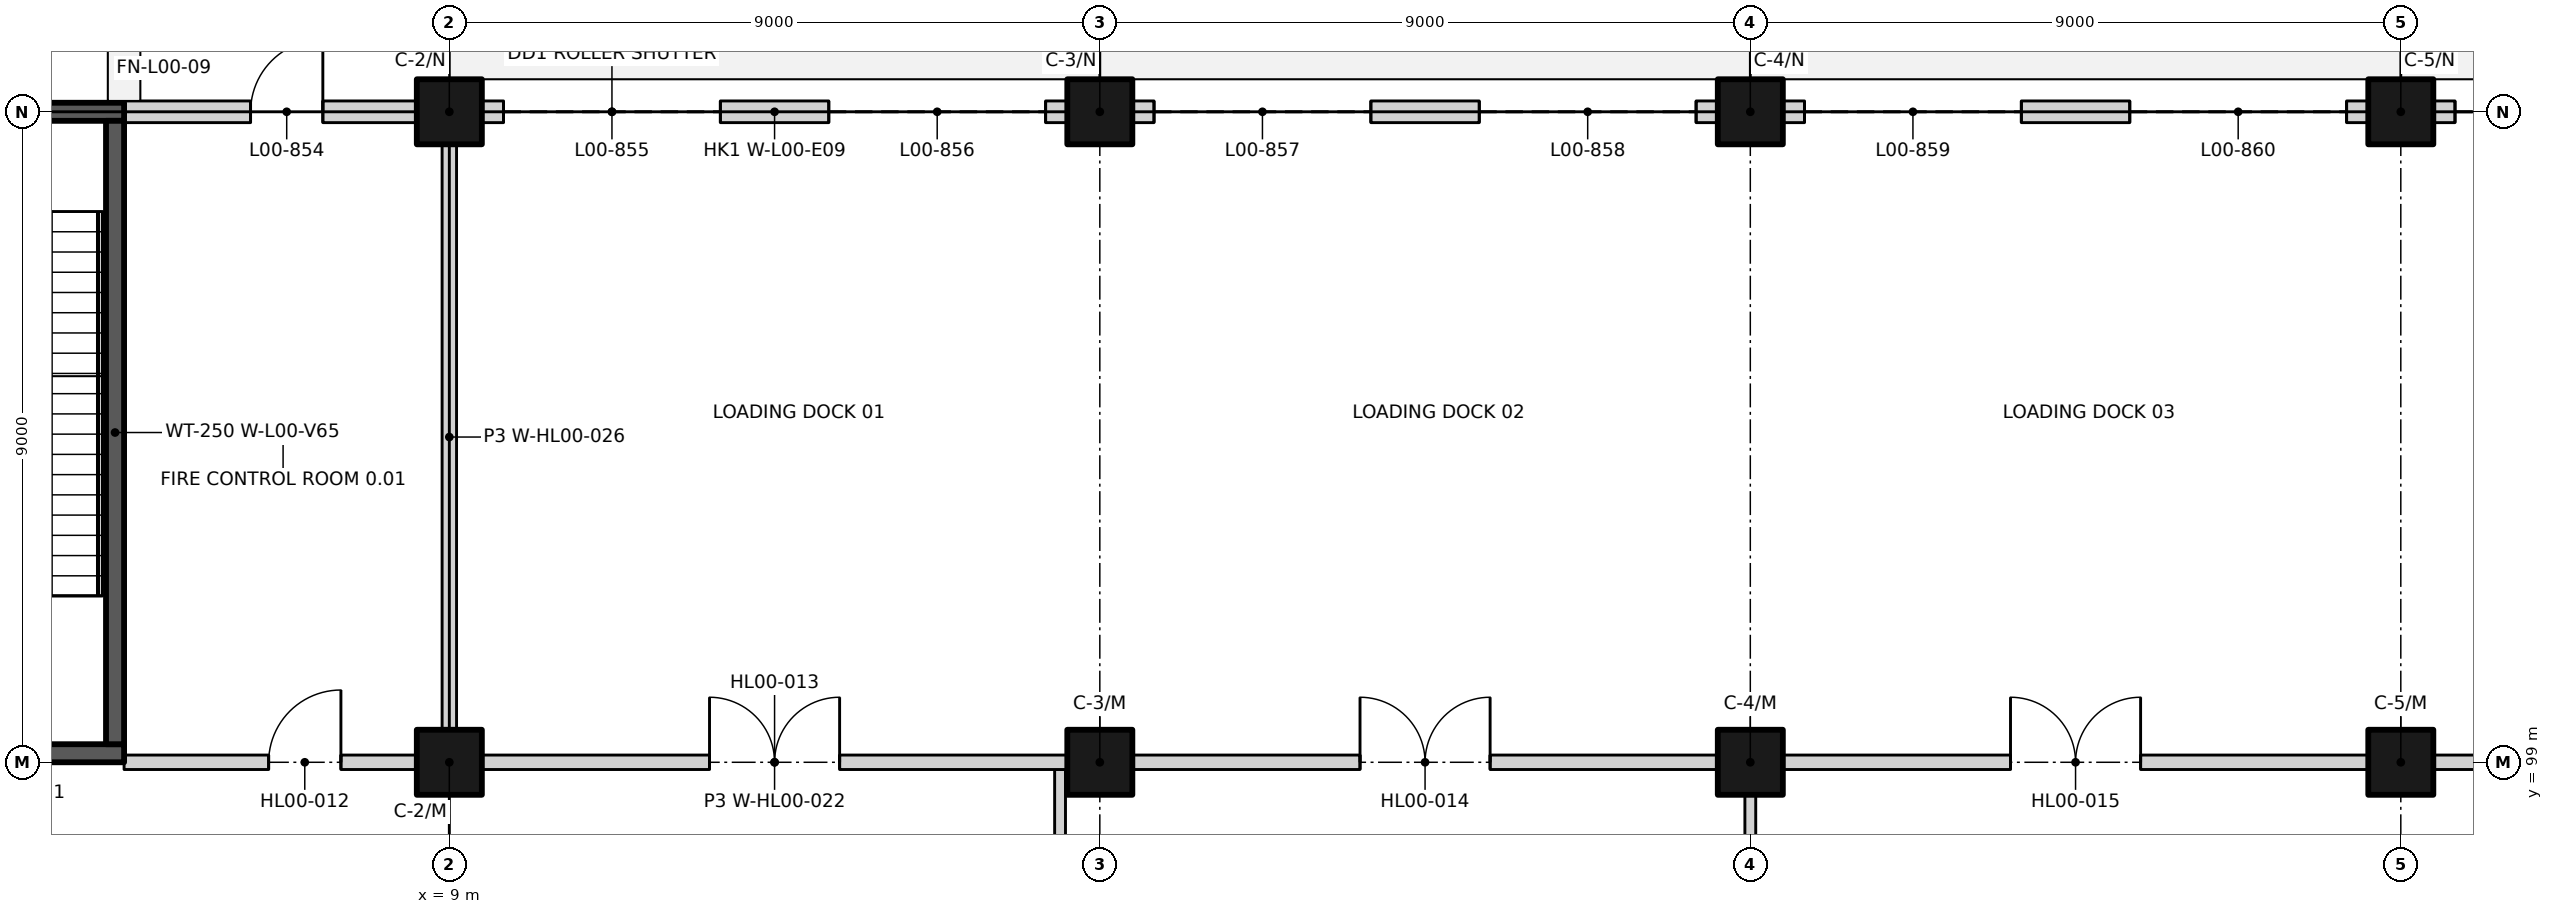
"""IFC4 building model, lengths in metres.
Left out: names, types, materials, properties, quantities, classifications, styles, units other than length and angle.
Written with IfcOpenShell. Run it as: python <this file> out.ifc"""

import sys

from ifc_helpers import new_model, si_unit, direction, frame, frame_2d, origin, origin_2d, place, context, subcontext, project, spatial, rectangle, extrude, element, fill, save


model = new_model("IFC4")
c1 = context("Model", 3, precision=1e-05, world=origin(), true_north=direction((0.0, 1.0)))
c2 = subcontext(c1, "Body", "Model", "MODEL_VIEW")
j1 = project(units=[si_unit("LENGTHUNIT", "METRE"), si_unit("PLANEANGLEUNIT", "RADIAN")], contexts=[c1])
p1 = place(None, origin())
s1 = spatial("IfcSite", under=j1, at=p1, CompositionType="ELEMENT")
p2 = place(p1, origin())
s2 = spatial("IfcBuilding", under=s1, at=p2, CompositionType="ELEMENT")
p3 = place(p2, origin())
s3 = spatial("IfcBuildingStorey", under=s2, at=p3, CompositionType="ELEMENT", Elevation=0.0)
for number, where, z_axis, x_axis in (
    (1, (9.0, 99.0, 0.0), (0.0, 0.0, 1.0), (1.0, 0.0, 0.0)),
    (2, (18.0, 99.0, 0.0), (0.0, 0.0, 1.0), (1.0, 0.0, 0.0)),
    (3, (27.0, 99.0, 0.0), (0.0, 0.0, 1.0), (1.0, 0.0, 0.0)),
    (4, (36.0, 99.0, 0.0), (0.0, 0.0, 1.0), (1.0, 0.0, 0.0)),
    (5, (9.0, 108.0, 0.0), (0.0, 0.0, 1.0), (1.0, 0.0, 0.0)),
    (6, (18.0, 108.0, 0.0), (0.0, 0.0, 1.0), (1.0, 0.0, 0.0)),
    (7, (27.0, 108.0, 0.0), (0.0, 0.0, 1.0), (1.0, 0.0, 0.0)),
    (8, (36.0, 108.0, 0.0), (0.0, 0.0, 1.0), (1.0, 0.0, 0.0)),
):
    element("IfcColumn", number, at=place(p3, frame(where, z_axis=z_axis, x_axis=x_axis)), inside=s3, PredefinedType="COLUMN", context=c2, shape_type="SweptSolid", body=[
        extrude(rectangle(XDim=0.9, YDim=0.9, at=origin_2d()), origin(), (0.0, 0.0, 1.0), 6.0),
    ])
p4 = place(p3, frame((0.45, 99.125, 0.0), z_axis=(0.0, 0.0, 1.0), x_axis=(1.0, 0.0, 0.0)))
e9 = element("IfcWall", 9, at=p4, inside=s3, PredefinedType="SHEAR", context=c2, shape_type="SweptSolid", body=[
    extrude(rectangle(XDim=4.05, YDim=0.25, at=frame_2d((2.025, 0.0))), origin(), (0.0, 0.0, 1.0), 6.0),
])
p5 = place(p4, frame((1.25, 0.0, 0.0)))
e10 = element("IfcOpeningElement", 10, at=p5, cuts=e9, PredefinedType="OPENING", context=c2, shape_type="SweptSolid", body=[
    extrude(rectangle(XDim=1.1, YDim=2.1, at=frame_2d((0.55, 1.05))), frame((0.0, 0.135, 0.0), z_axis=(0.0, -1.0, 0.0), x_axis=(1.0, 0.0, 0.0)), (0.0, 0.0, 1.0), 0.27),
])
p6 = place(p3, frame((2.188, 108.0, 0.0), z_axis=(0.0, 0.0, 1.0), x_axis=(1.0, 0.0, 0.0)))
e11 = element("IfcWall", 11, at=p6, inside=s3, PredefinedType="SHEAR", context=c2, shape_type="SweptSolid", body=[
    extrude(rectangle(XDim=2.312, YDim=0.25, at=frame_2d((1.156, 0.0))), origin(), (0.0, 0.0, 1.0), 6.0),
])
p7 = place(p3, frame((4.375, 99.25, 0.0), z_axis=(0.0, 0.0, 1.0), x_axis=(0.0, 1.0, 0.0)))
e12 = element("IfcWall", 12, at=p7, inside=s3, PredefinedType="SHEAR", context=c2, shape_type="SweptSolid", body=[
    extrude(rectangle(XDim=8.625, YDim=0.25, at=frame_2d((4.312, 0.0))), origin(), (0.0, 0.0, 1.0), 6.0),
])
p8 = place(p3, frame((4.5, 108.0, 0.0), z_axis=(0.0, 0.0, 1.0), x_axis=(1.0, 0.0, 0.0)))
e13 = element("IfcWall", 13, at=p8, inside=s3, PredefinedType="SOLIDWALL", context=c2, shape_type="SweptSolid", body=[
    extrude(rectangle(XDim=4.05, YDim=0.3, at=frame_2d((2.025, 0.0))), origin(), (0.0, 0.0, 1.0), 5.2),
])
p9 = place(p8, frame((1.75, 0.0, 0.0)))
e14 = element("IfcOpeningElement", 14, at=p9, cuts=e13, PredefinedType="OPENING", context=c2, shape_type="SweptSolid", body=[
    extrude(rectangle(XDim=1.0, YDim=2.1, at=frame_2d((0.5, 1.05))), frame((0.0, 0.16, 0.0), z_axis=(0.0, -1.0, 0.0), x_axis=(1.0, 0.0, 0.0)), (0.0, 0.0, 1.0), 0.32),
])
p10 = place(p3, frame((9.45, 108.0, 0.0), z_axis=(0.0, 0.0, 1.0), x_axis=(1.0, 0.0, 0.0)))
e15 = element("IfcWall", 15, at=p10, inside=s3, PredefinedType="SOLIDWALL", context=c2, shape_type="SweptSolid", body=[
    extrude(rectangle(XDim=8.1, YDim=0.3, at=frame_2d((4.05, 0.0))), origin(), (0.0, 0.0, 1.0), 5.2),
])
p11 = place(p10, frame((0.3, 0.0, 0.0)))
e16 = element("IfcOpeningElement", 16, at=p11, cuts=e15, PredefinedType="OPENING", context=c2, shape_type="SweptSolid", body=[
    extrude(rectangle(XDim=3.0, YDim=4.2, at=frame_2d((1.5, 2.1))), frame((0.0, 0.16, 0.0), z_axis=(0.0, -1.0, 0.0), x_axis=(1.0, 0.0, 0.0)), (0.0, 0.0, 1.0), 0.32),
])
p12 = place(p10, frame((4.8, 0.0, 0.0)))
e17 = element("IfcOpeningElement", 17, at=p12, cuts=e15, PredefinedType="OPENING", context=c2, shape_type="SweptSolid", body=[
    extrude(rectangle(XDim=3.0, YDim=4.2, at=frame_2d((1.5, 2.1))), frame((0.0, 0.16, 0.0), z_axis=(0.0, -1.0, 0.0), x_axis=(1.0, 0.0, 0.0)), (0.0, 0.0, 1.0), 0.32),
])
p13 = place(p3, frame((18.45, 108.0, 0.0), z_axis=(0.0, 0.0, 1.0), x_axis=(1.0, 0.0, 0.0)))
e18 = element("IfcWall", 18, at=p13, inside=s3, PredefinedType="SOLIDWALL", context=c2, shape_type="SweptSolid", body=[
    extrude(rectangle(XDim=8.1, YDim=0.3, at=frame_2d((4.05, 0.0))), origin(), (0.0, 0.0, 1.0), 5.2),
])
p14 = place(p13, frame((0.3, 0.0, 0.0)))
e19 = element("IfcOpeningElement", 19, at=p14, cuts=e18, PredefinedType="OPENING", context=c2, shape_type="SweptSolid", body=[
    extrude(rectangle(XDim=3.0, YDim=4.2, at=frame_2d((1.5, 2.1))), frame((0.0, 0.16, 0.0), z_axis=(0.0, -1.0, 0.0), x_axis=(1.0, 0.0, 0.0)), (0.0, 0.0, 1.0), 0.32),
])
p15 = place(p13, frame((4.8, 0.0, 0.0)))
e20 = element("IfcOpeningElement", 20, at=p15, cuts=e18, PredefinedType="OPENING", context=c2, shape_type="SweptSolid", body=[
    extrude(rectangle(XDim=3.0, YDim=4.2, at=frame_2d((1.5, 2.1))), frame((0.0, 0.16, 0.0), z_axis=(0.0, -1.0, 0.0), x_axis=(1.0, 0.0, 0.0)), (0.0, 0.0, 1.0), 0.32),
])
p16 = place(p3, frame((27.45, 108.0, 0.0), z_axis=(0.0, 0.0, 1.0), x_axis=(1.0, 0.0, 0.0)))
e21 = element("IfcWall", 21, at=p16, inside=s3, PredefinedType="SOLIDWALL", context=c2, shape_type="SweptSolid", body=[
    extrude(rectangle(XDim=8.1, YDim=0.3, at=frame_2d((4.05, 0.0))), origin(), (0.0, 0.0, 1.0), 5.2),
])
p17 = place(p16, frame((0.3, 0.0, 0.0)))
e22 = element("IfcOpeningElement", 22, at=p17, cuts=e21, PredefinedType="OPENING", context=c2, shape_type="SweptSolid", body=[
    extrude(rectangle(XDim=3.0, YDim=4.2, at=frame_2d((1.5, 2.1))), frame((0.0, 0.16, 0.0), z_axis=(0.0, -1.0, 0.0), x_axis=(1.0, 0.0, 0.0)), (0.0, 0.0, 1.0), 0.32),
])
p18 = place(p16, frame((4.8, 0.0, 0.0)))
e23 = element("IfcOpeningElement", 23, at=p18, cuts=e21, PredefinedType="OPENING", context=c2, shape_type="SweptSolid", body=[
    extrude(rectangle(XDim=3.0, YDim=4.2, at=frame_2d((1.5, 2.1))), frame((0.0, 0.16, 0.0), z_axis=(0.0, -1.0, 0.0), x_axis=(1.0, 0.0, 0.0)), (0.0, 0.0, 1.0), 0.32),
])
p19 = place(p3, frame((36.45, 108.0, 0.0), z_axis=(0.0, 0.0, 1.0), x_axis=(1.0, 0.0, 0.0)))
e24 = element("IfcWall", 24, at=p19, inside=s3, PredefinedType="SOLIDWALL", context=c2, shape_type="SweptSolid", body=[
    extrude(rectangle(XDim=8.1, YDim=0.3, at=frame_2d((4.05, 0.0))), origin(), (0.0, 0.0, 1.0), 5.2),
])
p20 = place(p19, frame((0.3, 0.0, 0.0)))
e25 = element("IfcOpeningElement", 25, at=p20, cuts=e24, PredefinedType="OPENING", context=c2, shape_type="SweptSolid", body=[
    extrude(rectangle(XDim=3.0, YDim=4.2, at=frame_2d((1.5, 2.1))), frame((0.0, 0.16, 0.0), z_axis=(0.0, -1.0, 0.0), x_axis=(1.0, 0.0, 0.0)), (0.0, 0.0, 1.0), 0.32),
])
p21 = place(p19, frame((4.8, 0.0, 0.0)))
e26 = element("IfcOpeningElement", 26, at=p21, cuts=e24, PredefinedType="OPENING", context=c2, shape_type="SweptSolid", body=[
    extrude(rectangle(XDim=3.0, YDim=4.2, at=frame_2d((1.5, 2.1))), frame((0.0, 0.16, 0.0), z_axis=(0.0, -1.0, 0.0), x_axis=(1.0, 0.0, 0.0)), (0.0, 0.0, 1.0), 0.32),
])
p22 = place(p3, frame((17.45, 90.075, 0.0), z_axis=(0.0, 0.0, 1.0), x_axis=(0.0, 1.0, 0.0)))
e27 = element("IfcWall", 27, at=p22, inside=s3, PredefinedType="PARTITIONING", context=c2, shape_type="SweptSolid", body=[
    extrude(rectangle(XDim=8.825, YDim=0.15, at=frame_2d((4.413, 0.0))), origin(), (0.0, 0.0, 1.0), 5.7),
])
p23 = place(p22, frame((7.675, 0.0, 0.0), z_axis=(0.0, 0.0, 1.0), x_axis=(-1.0, 0.0, 0.0)))
e28 = element("IfcOpeningElement", 28, at=p23, cuts=e27, PredefinedType="OPENING", context=c2, shape_type="SweptSolid", body=[
    extrude(rectangle(XDim=1.5, YDim=2.1, at=frame_2d((0.75, 1.05))), frame((0.0, 0.085, 0.0), z_axis=(0.0, -1.0, 0.0), x_axis=(1.0, 0.0, 0.0)), (0.0, 0.0, 1.0), 0.17),
])
p24 = place(p3, frame((27.0, 90.45, 0.0), z_axis=(0.0, 0.0, 1.0), x_axis=(0.0, 1.0, 0.0)))
e29 = element("IfcWall", 29, at=p24, inside=s3, PredefinedType="PARTITIONING", context=c2, shape_type="SweptSolid", body=[
    extrude(rectangle(XDim=8.1, YDim=0.15, at=frame_2d((4.05, 0.0))), origin(), (0.0, 0.0, 1.0), 5.7),
])
p25 = place(p24, frame((2.8, 0.0, 0.0)))
e30 = element("IfcOpeningElement", 30, at=p25, cuts=e29, PredefinedType="OPENING", context=c2, shape_type="SweptSolid", body=[
    extrude(rectangle(XDim=1.5, YDim=2.1, at=frame_2d((0.75, 1.05))), frame((0.0, 0.085, 0.0), z_axis=(0.0, -1.0, 0.0), x_axis=(1.0, 0.0, 0.0)), (0.0, 0.0, 1.0), 0.17),
])
p26 = place(p3, frame((4.5, 99.0, 0.0), z_axis=(0.0, 0.0, 1.0), x_axis=(1.0, 0.0, 0.0)))
e31 = element("IfcWall", 31, at=p26, inside=s3, PredefinedType="PARTITIONING", context=c2, shape_type="SweptSolid", body=[
    extrude(rectangle(XDim=4.05, YDim=0.2, at=frame_2d((2.025, 0.0))), origin(), (0.0, 0.0, 1.0), 5.7),
])
p27 = place(p26, frame((2.0, 0.0, 0.0)))
e32 = element("IfcOpeningElement", 32, at=p27, cuts=e31, PredefinedType="OPENING", context=c2, shape_type="SweptSolid", body=[
    extrude(rectangle(XDim=1.0, YDim=2.1, at=frame_2d((0.5, 1.05))), frame((0.0, 0.11, 0.0), z_axis=(0.0, -1.0, 0.0), x_axis=(1.0, 0.0, 0.0)), (0.0, 0.0, 1.0), 0.22),
])
p28 = place(p3, frame((9.45, 99.0, 0.0), z_axis=(0.0, 0.0, 1.0), x_axis=(1.0, 0.0, 0.0)))
e33 = element("IfcWall", 33, at=p28, inside=s3, PredefinedType="PARTITIONING", context=c2, shape_type="SweptSolid", body=[
    extrude(rectangle(XDim=8.1, YDim=0.2, at=frame_2d((4.05, 0.0))), origin(), (0.0, 0.0, 1.0), 5.7),
])
p29 = place(p28, frame((3.15, 0.0, 0.0)))
e34 = element("IfcOpeningElement", 34, at=p29, cuts=e33, PredefinedType="OPENING", context=c2, shape_type="SweptSolid", body=[
    extrude(rectangle(XDim=1.8, YDim=2.4, at=frame_2d((0.9, 1.2))), frame((0.0, 0.11, 0.0), z_axis=(0.0, -1.0, 0.0), x_axis=(1.0, 0.0, 0.0)), (0.0, 0.0, 1.0), 0.22),
])
p30 = place(p3, frame((18.45, 99.0, 0.0), z_axis=(0.0, 0.0, 1.0), x_axis=(1.0, 0.0, 0.0)))
e35 = element("IfcWall", 35, at=p30, inside=s3, PredefinedType="PARTITIONING", context=c2, shape_type="SweptSolid", body=[
    extrude(rectangle(XDim=8.1, YDim=0.2, at=frame_2d((4.05, 0.0))), origin(), (0.0, 0.0, 1.0), 5.7),
])
p31 = place(p30, frame((3.15, 0.0, 0.0)))
e36 = element("IfcOpeningElement", 36, at=p31, cuts=e35, PredefinedType="OPENING", context=c2, shape_type="SweptSolid", body=[
    extrude(rectangle(XDim=1.8, YDim=2.4, at=frame_2d((0.9, 1.2))), frame((0.0, 0.11, 0.0), z_axis=(0.0, -1.0, 0.0), x_axis=(1.0, 0.0, 0.0)), (0.0, 0.0, 1.0), 0.22),
])
p32 = place(p3, frame((27.45, 99.0, 0.0), z_axis=(0.0, 0.0, 1.0), x_axis=(1.0, 0.0, 0.0)))
e37 = element("IfcWall", 37, at=p32, inside=s3, PredefinedType="PARTITIONING", context=c2, shape_type="SweptSolid", body=[
    extrude(rectangle(XDim=8.1, YDim=0.2, at=frame_2d((4.05, 0.0))), origin(), (0.0, 0.0, 1.0), 5.7),
])
p33 = place(p32, frame((3.15, 0.0, 0.0)))
e38 = element("IfcOpeningElement", 38, at=p33, cuts=e37, PredefinedType="OPENING", context=c2, shape_type="SweptSolid", body=[
    extrude(rectangle(XDim=1.8, YDim=2.4, at=frame_2d((0.9, 1.2))), frame((0.0, 0.11, 0.0), z_axis=(0.0, -1.0, 0.0), x_axis=(1.0, 0.0, 0.0)), (0.0, 0.0, 1.0), 0.22),
])
p34 = place(p3, frame((36.45, 99.0, 0.0), z_axis=(0.0, 0.0, 1.0), x_axis=(1.0, 0.0, 0.0)))
e39 = element("IfcWall", 39, at=p34, inside=s3, PredefinedType="PARTITIONING", context=c2, shape_type="SweptSolid", body=[
    extrude(rectangle(XDim=8.1, YDim=0.2, at=frame_2d((4.05, 0.0))), origin(), (0.0, 0.0, 1.0), 5.7),
])
p35 = place(p34, frame((3.15, 0.0, 0.0)))
e40 = element("IfcOpeningElement", 40, at=p35, cuts=e39, PredefinedType="OPENING", context=c2, shape_type="SweptSolid", body=[
    extrude(rectangle(XDim=1.8, YDim=2.4, at=frame_2d((0.9, 1.2))), frame((0.0, 0.11, 0.0), z_axis=(0.0, -1.0, 0.0), x_axis=(1.0, 0.0, 0.0)), (0.0, 0.0, 1.0), 0.22),
])
p36 = place(p3, frame((9.0, 99.45, 0.0), z_axis=(0.0, 0.0, 1.0), x_axis=(0.0, 1.0, 0.0)))
e41 = element("IfcWall", 41, at=p36, inside=s3, PredefinedType="PARTITIONING", context=c2, shape_type="SweptSolid", body=[
    extrude(rectangle(XDim=8.1, YDim=0.2, at=frame_2d((4.05, 0.0))), origin(), (0.0, 0.0, 1.0), 5.7),
])
p37 = place(p9, origin())
e42 = element("IfcDoor", 42, at=p37, inside=s3, OperationType="SINGLE_SWING_RIGHT", PredefinedType="DOOR", context=c2, shape_type="SweptSolid", body=[
    extrude(rectangle(XDim=1.0, YDim=2.1, at=frame_2d((0.5, 1.05))), frame((0.0, 0.025, 0.0), z_axis=(0.0, -1.0, 0.0), x_axis=(1.0, 0.0, 0.0)), (0.0, 0.0, 1.0), 0.05),
])
fill(e14, e42)
p38 = place(p11, origin())
e43 = element("IfcDoor", 43, at=p38, inside=s3, OperationType="ROLLINGUP", PredefinedType="DOOR", context=c2, shape_type="SweptSolid", body=[
    extrude(rectangle(XDim=3.0, YDim=4.2, at=frame_2d((1.5, 2.1))), frame((0.0, 0.025, 0.0), z_axis=(0.0, -1.0, 0.0), x_axis=(1.0, 0.0, 0.0)), (0.0, 0.0, 1.0), 0.05),
])
fill(e16, e43)
p39 = place(p12, origin())
e44 = element("IfcDoor", 44, at=p39, inside=s3, OperationType="ROLLINGUP", PredefinedType="DOOR", context=c2, shape_type="SweptSolid", body=[
    extrude(rectangle(XDim=3.0, YDim=4.2, at=frame_2d((1.5, 2.1))), frame((0.0, 0.025, 0.0), z_axis=(0.0, -1.0, 0.0), x_axis=(1.0, 0.0, 0.0)), (0.0, 0.0, 1.0), 0.05),
])
fill(e17, e44)
p40 = place(p14, origin())
e45 = element("IfcDoor", 45, at=p40, inside=s3, OperationType="ROLLINGUP", PredefinedType="DOOR", context=c2, shape_type="SweptSolid", body=[
    extrude(rectangle(XDim=3.0, YDim=4.2, at=frame_2d((1.5, 2.1))), frame((0.0, 0.025, 0.0), z_axis=(0.0, -1.0, 0.0), x_axis=(1.0, 0.0, 0.0)), (0.0, 0.0, 1.0), 0.05),
])
fill(e19, e45)
p41 = place(p15, origin())
e46 = element("IfcDoor", 46, at=p41, inside=s3, OperationType="ROLLINGUP", PredefinedType="DOOR", context=c2, shape_type="SweptSolid", body=[
    extrude(rectangle(XDim=3.0, YDim=4.2, at=frame_2d((1.5, 2.1))), frame((0.0, 0.025, 0.0), z_axis=(0.0, -1.0, 0.0), x_axis=(1.0, 0.0, 0.0)), (0.0, 0.0, 1.0), 0.05),
])
fill(e20, e46)
p42 = place(p17, origin())
e47 = element("IfcDoor", 47, at=p42, inside=s3, OperationType="ROLLINGUP", PredefinedType="DOOR", context=c2, shape_type="SweptSolid", body=[
    extrude(rectangle(XDim=3.0, YDim=4.2, at=frame_2d((1.5, 2.1))), frame((0.0, 0.025, 0.0), z_axis=(0.0, -1.0, 0.0), x_axis=(1.0, 0.0, 0.0)), (0.0, 0.0, 1.0), 0.05),
])
fill(e22, e47)
p43 = place(p18, origin())
e48 = element("IfcDoor", 48, at=p43, inside=s3, OperationType="ROLLINGUP", PredefinedType="DOOR", context=c2, shape_type="SweptSolid", body=[
    extrude(rectangle(XDim=3.0, YDim=4.2, at=frame_2d((1.5, 2.1))), frame((0.0, 0.025, 0.0), z_axis=(0.0, -1.0, 0.0), x_axis=(1.0, 0.0, 0.0)), (0.0, 0.0, 1.0), 0.05),
])
fill(e23, e48)
p44 = place(p20, origin())
e49 = element("IfcDoor", 49, at=p44, inside=s3, OperationType="ROLLINGUP", PredefinedType="DOOR", context=c2, shape_type="SweptSolid", body=[
    extrude(rectangle(XDim=3.0, YDim=4.2, at=frame_2d((1.5, 2.1))), frame((0.0, 0.025, 0.0), z_axis=(0.0, -1.0, 0.0), x_axis=(1.0, 0.0, 0.0)), (0.0, 0.0, 1.0), 0.05),
])
fill(e25, e49)
p45 = place(p27, origin())
e50 = element("IfcDoor", 50, at=p45, inside=s3, OperationType="SINGLE_SWING_RIGHT", PredefinedType="DOOR", context=c2, shape_type="SweptSolid", body=[
    extrude(rectangle(XDim=1.0, YDim=2.1, at=frame_2d((0.5, 1.05))), frame((0.0, 0.025, 0.0), z_axis=(0.0, -1.0, 0.0), x_axis=(1.0, 0.0, 0.0)), (0.0, 0.0, 1.0), 0.05),
])
fill(e32, e50)
p46 = place(p29, origin())
e51 = element("IfcDoor", 51, at=p46, inside=s3, OperationType="DOUBLE_DOOR_SINGLE_SWING", PredefinedType="DOOR", context=c2, shape_type="SweptSolid", body=[
    extrude(rectangle(XDim=1.8, YDim=2.4, at=frame_2d((0.9, 1.2))), frame((0.0, 0.025, 0.0), z_axis=(0.0, -1.0, 0.0), x_axis=(1.0, 0.0, 0.0)), (0.0, 0.0, 1.0), 0.05),
])
fill(e34, e51)
p47 = place(p31, origin())
e52 = element("IfcDoor", 52, at=p47, inside=s3, OperationType="DOUBLE_DOOR_SINGLE_SWING", PredefinedType="DOOR", context=c2, shape_type="SweptSolid", body=[
    extrude(rectangle(XDim=1.8, YDim=2.4, at=frame_2d((0.9, 1.2))), frame((0.0, 0.025, 0.0), z_axis=(0.0, -1.0, 0.0), x_axis=(1.0, 0.0, 0.0)), (0.0, 0.0, 1.0), 0.05),
])
fill(e36, e52)
p48 = place(p33, origin())
e53 = element("IfcDoor", 53, at=p48, inside=s3, OperationType="DOUBLE_DOOR_SINGLE_SWING", PredefinedType="DOOR", context=c2, shape_type="SweptSolid", body=[
    extrude(rectangle(XDim=1.8, YDim=2.4, at=frame_2d((0.9, 1.2))), frame((0.0, 0.025, 0.0), z_axis=(0.0, -1.0, 0.0), x_axis=(1.0, 0.0, 0.0)), (0.0, 0.0, 1.0), 0.05),
])
fill(e38, e53)
save(model, sys.argv[1])
